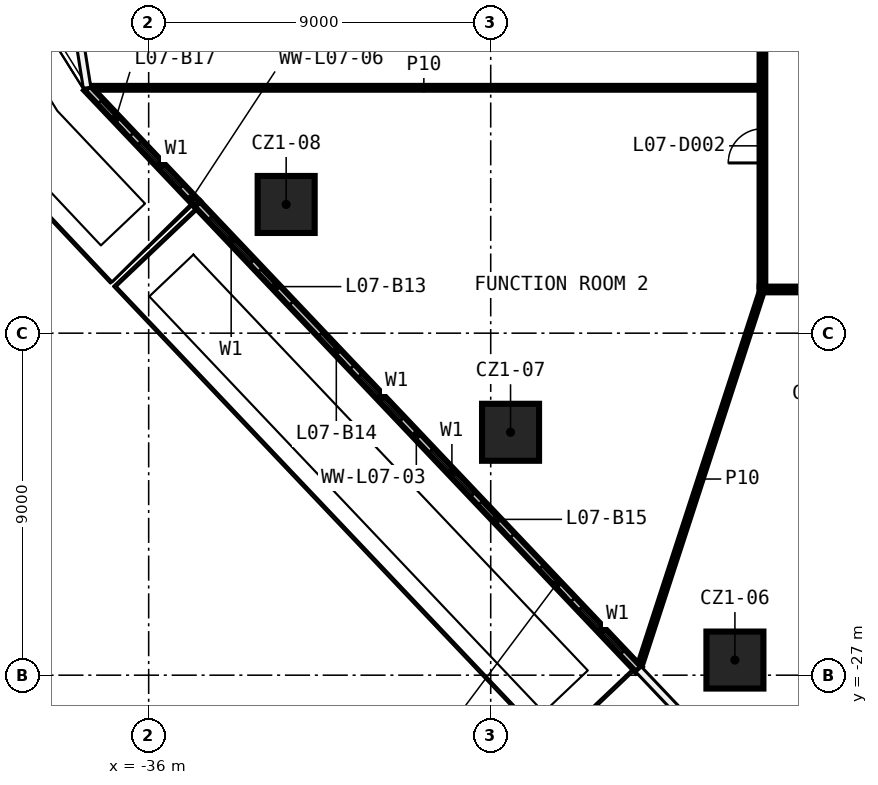
"""IFC4 building model, lengths in metres.
Left out: names, types, materials, properties, quantities, classifications, styles, units other than length and angle.
Written with IfcOpenShell. Run it as: python <this file> out.ifc"""

import sys

from ifc_helpers import new_model, si_unit, direction, frame, frame_2d, origin, origin_2d, place, context, subcontext, project, spatial, rectangle, extrude, element, fill, save


model = new_model("IFC4")
c1 = context("Model", 3, precision=1e-05, world=origin(), true_north=direction((0.0, 1.0)))
c2 = subcontext(c1, "Body", "Model", "MODEL_VIEW")
j1 = project(units=[si_unit("LENGTHUNIT", "METRE"), si_unit("PLANEANGLEUNIT", "RADIAN")], contexts=[c1])
p1 = place(None, origin())
s1 = spatial("IfcSite", under=j1, at=p1, CompositionType="ELEMENT")
p2 = place(p1, origin())
s2 = spatial("IfcBuilding", under=s1, at=p2, CompositionType="ELEMENT")
p3 = place(p2, frame((0.0, 0.0, 47.7)))
s3 = spatial("IfcBuildingStorey", under=s2, at=p3, CompositionType="ELEMENT", Elevation=47.7)
for number, where, z_axis, x_axis in (
    (1, (-20.574, -26.602, 0.0), (0.0, 0.0, 1.0), (1.0, 0.0, 0.0)),
    (2, (-26.478, -20.608, 0.0), (0.0, 0.0, 1.0), (1.0, 0.0, 0.0)),
    (3, (-32.382, -14.613, 0.0), (0.0, 0.0, 1.0), (1.0, 0.0, 0.0)),
):
    element("IfcColumn", number, at=place(p3, frame(where, z_axis=z_axis, x_axis=x_axis)), inside=s3, PredefinedType="COLUMN", context=c2, shape_type="SweptSolid", body=[
        extrude(rectangle(XDim=1.5, YDim=1.5, at=origin_2d()), origin(), (0.0, 0.0, 1.0), 3.3),
    ])
p4 = place(p3, frame((19.925, -16.85, 0.0), z_axis=(0.0, 0.0, 1.0), x_axis=(-1.0, 0.0, 0.0)))
e4 = element("IfcWall", 4, at=p4, inside=s3, PredefinedType="PARTITIONING", context=c2, shape_type="SweptSolid", body=[
    extrude(rectangle(XDim=39.85, YDim=0.15, at=frame_2d((19.925, 0.0))), origin(), (0.0, 0.0, 1.0), 3.3),
])
p5 = place(p4, frame((31.008, 0.0, 0.0)))
e5 = element("IfcOpeningElement", 5, at=p5, cuts=e4, PredefinedType="OPENING", context=c2, shape_type="SweptSolid", body=[
    extrude(rectangle(XDim=0.9, YDim=2.1, at=frame_2d((0.45, 1.05))), frame((0.0, 0.085, 0.0), z_axis=(0.0, -1.0, 0.0), x_axis=(1.0, 0.0, 0.0)), (0.0, 0.0, 1.0), 0.17),
])
p6 = place(p4, frame((22.704, 0.0, 0.0)))
e6 = element("IfcOpeningElement", 6, at=p6, cuts=e4, PredefinedType="OPENING", context=c2, shape_type="SweptSolid", body=[
    extrude(rectangle(XDim=0.9, YDim=2.1, at=frame_2d((0.45, 1.05))), frame((0.0, 0.085, 0.0), z_axis=(0.0, -1.0, 0.0), x_axis=(1.0, 0.0, 0.0)), (0.0, 0.0, 1.0), 0.17),
])
p7 = place(p4, frame((3.888, 0.0, 0.0)))
e7 = element("IfcOpeningElement", 7, at=p7, cuts=e4, PredefinedType="OPENING", context=c2, shape_type="SweptSolid", body=[
    extrude(rectangle(XDim=0.9, YDim=2.1, at=frame_2d((0.45, 1.05))), frame((0.0, 0.085, 0.0), z_axis=(0.0, -1.0, 0.0), x_axis=(1.0, 0.0, 0.0)), (0.0, 0.0, 1.0), 0.17),
])
p8 = place(p3, frame((-37.594, -11.543, 0.0), z_axis=(0.0, 0.0, 1.0), x_axis=(1.0, 0.0, 0.0)))
e8 = element("IfcWall", 8, at=p8, inside=s3, PredefinedType="PARTITIONING", context=c2, shape_type="SweptSolid", body=[
    extrude(rectangle(XDim=17.668, YDim=0.1, at=frame_2d((8.834, 0.0))), origin(), (0.0, 0.0, 1.0), 3.3),
])
p9 = place(p3, frame((-23.101, -26.826, 0.0), z_axis=(0.0, 0.0, 1.0), x_axis=(0.309854630824, 0.950783943784, 0.0)))
e9 = element("IfcWall", 9, at=p9, inside=s3, PredefinedType="PARTITIONING", context=c2, shape_type="SweptSolid", body=[
    extrude(rectangle(XDim=10.493, YDim=0.1, at=frame_2d((5.246, 0.0))), origin(), (0.0, 0.0, 1.0), 3.3),
])
p10 = place(p3, frame((-19.85, -16.775, 0.0), z_axis=(0.0, 0.0, 1.0), x_axis=(0.0, 1.0, 0.0)))
e10 = element("IfcWall", 10, at=p10, inside=s3, PredefinedType="PARTITIONING", context=c2, shape_type="SweptSolid", body=[
    extrude(rectangle(XDim=33.55, YDim=0.15, at=frame_2d((16.775, 0.0))), origin(), (0.0, 0.0, 1.0), 3.3),
])
p11 = place(p10, frame((12.256, 0.0, 0.0)))
e11 = element("IfcOpeningElement", 11, at=p11, cuts=e10, PredefinedType="OPENING", context=c2, shape_type="SweptSolid", body=[
    extrude(rectangle(XDim=0.9, YDim=2.1, at=frame_2d((0.45, 1.05))), frame((0.0, 0.085, 0.0), z_axis=(0.0, -1.0, 0.0), x_axis=(1.0, 0.0, 0.0)), (0.0, 0.0, 1.0), 0.17),
])
p12 = place(p10, frame((3.254, 0.0, 0.0)))
e12 = element("IfcOpeningElement", 12, at=p12, cuts=e10, PredefinedType="OPENING", context=c2, shape_type="SweptSolid", body=[
    extrude(rectangle(XDim=0.9, YDim=2.1, at=frame_2d((0.45, 1.05))), frame((0.0, 0.085, 0.0), z_axis=(0.0, -1.0, 0.0), x_axis=(1.0, 0.0, 0.0)), (0.0, 0.0, 1.0), 0.17),
])
p13 = place(p10, frame((27.451, 0.0, 0.0)))
e13 = element("IfcOpeningElement", 13, at=p13, cuts=e10, PredefinedType="OPENING", context=c2, shape_type="SweptSolid", body=[
    extrude(rectangle(XDim=0.9, YDim=2.1, at=frame_2d((0.45, 1.05))), frame((0.0, 0.085, 0.0), z_axis=(0.0, -1.0, 0.0), x_axis=(1.0, 0.0, 0.0)), (0.0, 0.0, 1.0), 0.17),
])
p14 = place(p3, frame((-34.724, -14.598, 0.0), z_axis=(0.0, 0.0, 1.0), x_axis=(0.688093946104, -0.725621610301, 0.0)))
e14 = element("IfcWall", 14, at=p14, inside=s3, PredefinedType="SOLIDWALL", context=c2, shape_type="SweptSolid", body=[
    extrude(rectangle(XDim=16.882, YDim=0.2, at=frame_2d((8.441, 0.0))), origin(), (0.0, 0.0, 1.0), 3.3),
])
p15 = place(p14, frame((0.5, 0.0, 0.6)))
e15 = element("IfcOpeningElement", 15, at=p15, cuts=e14, PredefinedType="OPENING", context=c2, shape_type="SweptSolid", body=[
    extrude(rectangle(XDim=1.6, YDim=2.4, at=frame_2d((0.8, 1.2))), frame((0.0, 0.11, 0.0), z_axis=(0.0, -1.0, 0.0), x_axis=(1.0, 0.0, 0.0)), (0.0, 0.0, 1.0), 0.22),
])
p16 = place(p14, frame((2.4, 0.0, 0.0)))
e16 = element("IfcOpeningElement", 16, at=p16, cuts=e14, PredefinedType="OPENING", context=c2, shape_type="SweptSolid", body=[
    extrude(rectangle(XDim=1.2, YDim=2.4, at=frame_2d((0.6, 1.2))), frame((0.0, 0.11, 0.0), z_axis=(0.0, -1.0, 0.0), x_axis=(1.0, 0.0, 0.0)), (0.0, 0.0, 1.0), 0.22),
])
p17 = place(p14, frame((6.22, 0.0, 0.6)))
e17 = element("IfcOpeningElement", 17, at=p17, cuts=e14, PredefinedType="OPENING", context=c2, shape_type="SweptSolid", body=[
    extrude(rectangle(XDim=1.6, YDim=2.4, at=frame_2d((0.8, 1.2))), frame((0.0, 0.11, 0.0), z_axis=(0.0, -1.0, 0.0), x_axis=(1.0, 0.0, 0.0)), (0.0, 0.0, 1.0), 0.22),
])
p18 = place(p14, frame((4.72, 0.0, 0.0)))
e18 = element("IfcOpeningElement", 18, at=p18, cuts=e14, PredefinedType="OPENING", context=c2, shape_type="SweptSolid", body=[
    extrude(rectangle(XDim=1.2, YDim=2.4, at=frame_2d((0.6, 1.2))), frame((0.0, 0.11, 0.0), z_axis=(0.0, -1.0, 0.0), x_axis=(1.0, 0.0, 0.0)), (0.0, 0.0, 1.0), 0.22),
])
p19 = place(p14, frame((8.941, 0.0, 0.6)))
e19 = element("IfcOpeningElement", 19, at=p19, cuts=e14, PredefinedType="OPENING", context=c2, shape_type="SweptSolid", body=[
    extrude(rectangle(XDim=1.6, YDim=2.4, at=frame_2d((0.8, 1.2))), frame((0.0, 0.11, 0.0), z_axis=(0.0, -1.0, 0.0), x_axis=(1.0, 0.0, 0.0)), (0.0, 0.0, 1.0), 0.22),
])
p20 = place(p14, frame((10.841, 0.0, 0.0)))
e20 = element("IfcOpeningElement", 20, at=p20, cuts=e14, PredefinedType="OPENING", context=c2, shape_type="SweptSolid", body=[
    extrude(rectangle(XDim=1.2, YDim=2.4, at=frame_2d((0.6, 1.2))), frame((0.0, 0.11, 0.0), z_axis=(0.0, -1.0, 0.0), x_axis=(1.0, 0.0, 0.0)), (0.0, 0.0, 1.0), 0.22),
])
p21 = place(p14, frame((14.662, 0.0, 0.6)))
e21 = element("IfcOpeningElement", 21, at=p21, cuts=e14, PredefinedType="OPENING", context=c2, shape_type="SweptSolid", body=[
    extrude(rectangle(XDim=1.6, YDim=2.4, at=frame_2d((0.8, 1.2))), frame((0.0, 0.11, 0.0), z_axis=(0.0, -1.0, 0.0), x_axis=(1.0, 0.0, 0.0)), (0.0, 0.0, 1.0), 0.22),
])
p22 = place(p14, frame((13.162, 0.0, 0.0)))
e22 = element("IfcOpeningElement", 22, at=p22, cuts=e14, PredefinedType="OPENING", context=c2, shape_type="SweptSolid", body=[
    extrude(rectangle(XDim=1.2, YDim=2.4, at=frame_2d((0.6, 1.2))), frame((0.0, 0.11, 0.0), z_axis=(0.0, -1.0, 0.0), x_axis=(1.0, 0.0, 0.0)), (0.0, 0.0, 1.0), 0.22),
])
p23 = place(p3, frame((-37.621, -11.543, 0.0), z_axis=(0.0, 0.0, 1.0), x_axis=(0.688100005166, -0.725615864553, 0.0)))
e23 = element("IfcWall", 23, at=p23, inside=s3, PredefinedType="SOLIDWALL", context=c2, shape_type="SweptSolid", body=[
    extrude(rectangle(XDim=4.21, YDim=0.2, at=frame_2d((2.105, 0.0))), origin(), (0.0, 0.0, 1.0), 3.3),
])
p24 = place(p23, frame((2.0, 0.0, 0.6)))
e24 = element("IfcOpeningElement", 24, at=p24, cuts=e23, PredefinedType="OPENING", context=c2, shape_type="SweptSolid", body=[
    extrude(rectangle(XDim=1.6, YDim=2.4, at=frame_2d((0.8, 1.2))), frame((0.0, 0.11, 0.0), z_axis=(0.0, -1.0, 0.0), x_axis=(1.0, 0.0, 0.0)), (0.0, 0.0, 1.0), 0.22),
])
p25 = place(p23, frame((0.5, 0.0, 0.0)))
e25 = element("IfcOpeningElement", 25, at=p25, cuts=e23, PredefinedType="OPENING", context=c2, shape_type="SweptSolid", body=[
    extrude(rectangle(XDim=1.2, YDim=2.4, at=frame_2d((0.6, 1.2))), frame((0.0, 0.11, 0.0), z_axis=(0.0, -1.0, 0.0), x_axis=(1.0, 0.0, 0.0)), (0.0, 0.0, 1.0), 0.22),
])
p26 = place(p12, origin())
e26 = element("IfcDoor", 26, at=p26, inside=s3, OperationType="SINGLE_SWING_LEFT", PredefinedType="DOOR", context=c2, shape_type="SweptSolid", body=[
    extrude(rectangle(XDim=0.9, YDim=2.1, at=frame_2d((0.45, 1.05))), frame((0.0, 0.025, 0.0), z_axis=(0.0, -1.0, 0.0), x_axis=(1.0, 0.0, 0.0)), (0.0, 0.0, 1.0), 0.05),
])
fill(e12, e26)
p27 = place(p15, origin())
e27 = element("IfcWindow", 27, at=p27, inside=s3, PartitioningType="SINGLE_PANEL", PredefinedType="WINDOW", context=c2, shape_type="SweptSolid", body=[
    extrude(rectangle(XDim=1.6, YDim=2.4, at=frame_2d((0.8, 1.2))), frame((0.0, 0.03, 0.0), z_axis=(0.0, -1.0, 0.0), x_axis=(1.0, 0.0, 0.0)), (0.0, 0.0, 1.0), 0.06),
])
fill(e15, e27)
p28 = place(p16, origin())
e28 = element("IfcDoor", 28, at=p28, inside=s3, OperationType="SLIDING_TO_LEFT", PredefinedType="DOOR", context=c2, shape_type="SweptSolid", body=[
    extrude(rectangle(XDim=1.2, YDim=2.4, at=frame_2d((0.6, 1.2))), frame((0.0, 0.025, 0.0), z_axis=(0.0, -1.0, 0.0), x_axis=(1.0, 0.0, 0.0)), (0.0, 0.0, 1.0), 0.05),
])
fill(e16, e28)
p29 = place(p17, origin())
e29 = element("IfcWindow", 29, at=p29, inside=s3, PartitioningType="SINGLE_PANEL", PredefinedType="WINDOW", context=c2, shape_type="SweptSolid", body=[
    extrude(rectangle(XDim=1.6, YDim=2.4, at=frame_2d((0.8, 1.2))), frame((0.0, 0.03, 0.0), z_axis=(0.0, -1.0, 0.0), x_axis=(1.0, 0.0, 0.0)), (0.0, 0.0, 1.0), 0.06),
])
fill(e17, e29)
p30 = place(p18, origin())
e30 = element("IfcDoor", 30, at=p30, inside=s3, OperationType="SLIDING_TO_LEFT", PredefinedType="DOOR", context=c2, shape_type="SweptSolid", body=[
    extrude(rectangle(XDim=1.2, YDim=2.4, at=frame_2d((0.6, 1.2))), frame((0.0, 0.025, 0.0), z_axis=(0.0, -1.0, 0.0), x_axis=(1.0, 0.0, 0.0)), (0.0, 0.0, 1.0), 0.05),
])
fill(e18, e30)
p31 = place(p19, origin())
e31 = element("IfcWindow", 31, at=p31, inside=s3, PartitioningType="SINGLE_PANEL", PredefinedType="WINDOW", context=c2, shape_type="SweptSolid", body=[
    extrude(rectangle(XDim=1.6, YDim=2.4, at=frame_2d((0.8, 1.2))), frame((0.0, 0.03, 0.0), z_axis=(0.0, -1.0, 0.0), x_axis=(1.0, 0.0, 0.0)), (0.0, 0.0, 1.0), 0.06),
])
fill(e19, e31)
p32 = place(p20, origin())
e32 = element("IfcDoor", 32, at=p32, inside=s3, OperationType="SLIDING_TO_LEFT", PredefinedType="DOOR", context=c2, shape_type="SweptSolid", body=[
    extrude(rectangle(XDim=1.2, YDim=2.4, at=frame_2d((0.6, 1.2))), frame((0.0, 0.025, 0.0), z_axis=(0.0, -1.0, 0.0), x_axis=(1.0, 0.0, 0.0)), (0.0, 0.0, 1.0), 0.05),
])
fill(e20, e32)
p33 = place(p21, origin())
e33 = element("IfcWindow", 33, at=p33, inside=s3, PartitioningType="SINGLE_PANEL", PredefinedType="WINDOW", context=c2, shape_type="SweptSolid", body=[
    extrude(rectangle(XDim=1.6, YDim=2.4, at=frame_2d((0.8, 1.2))), frame((0.0, 0.03, 0.0), z_axis=(0.0, -1.0, 0.0), x_axis=(1.0, 0.0, 0.0)), (0.0, 0.0, 1.0), 0.06),
])
fill(e21, e33)
p34 = place(p22, origin())
e34 = element("IfcDoor", 34, at=p34, inside=s3, OperationType="SLIDING_TO_LEFT", PredefinedType="DOOR", context=c2, shape_type="SweptSolid", body=[
    extrude(rectangle(XDim=1.2, YDim=2.4, at=frame_2d((0.6, 1.2))), frame((0.0, 0.025, 0.0), z_axis=(0.0, -1.0, 0.0), x_axis=(1.0, 0.0, 0.0)), (0.0, 0.0, 1.0), 0.05),
])
fill(e22, e34)
p35 = place(p24, origin())
e35 = element("IfcWindow", 35, at=p35, inside=s3, PartitioningType="SINGLE_PANEL", PredefinedType="WINDOW", context=c2, shape_type="SweptSolid", body=[
    extrude(rectangle(XDim=1.6, YDim=2.4, at=frame_2d((0.8, 1.2))), frame((0.0, 0.03, 0.0), z_axis=(0.0, -1.0, 0.0), x_axis=(1.0, 0.0, 0.0)), (0.0, 0.0, 1.0), 0.06),
])
fill(e24, e35)
p36 = place(p25, origin())
e36 = element("IfcDoor", 36, at=p36, inside=s3, OperationType="SLIDING_TO_LEFT", PredefinedType="DOOR", context=c2, shape_type="SweptSolid", body=[
    extrude(rectangle(XDim=1.2, YDim=2.4, at=frame_2d((0.6, 1.2))), frame((0.0, 0.025, 0.0), z_axis=(0.0, -1.0, 0.0), x_axis=(1.0, 0.0, 0.0)), (0.0, 0.0, 1.0), 0.05),
])
fill(e25, e36)
save(model, sys.argv[1])
